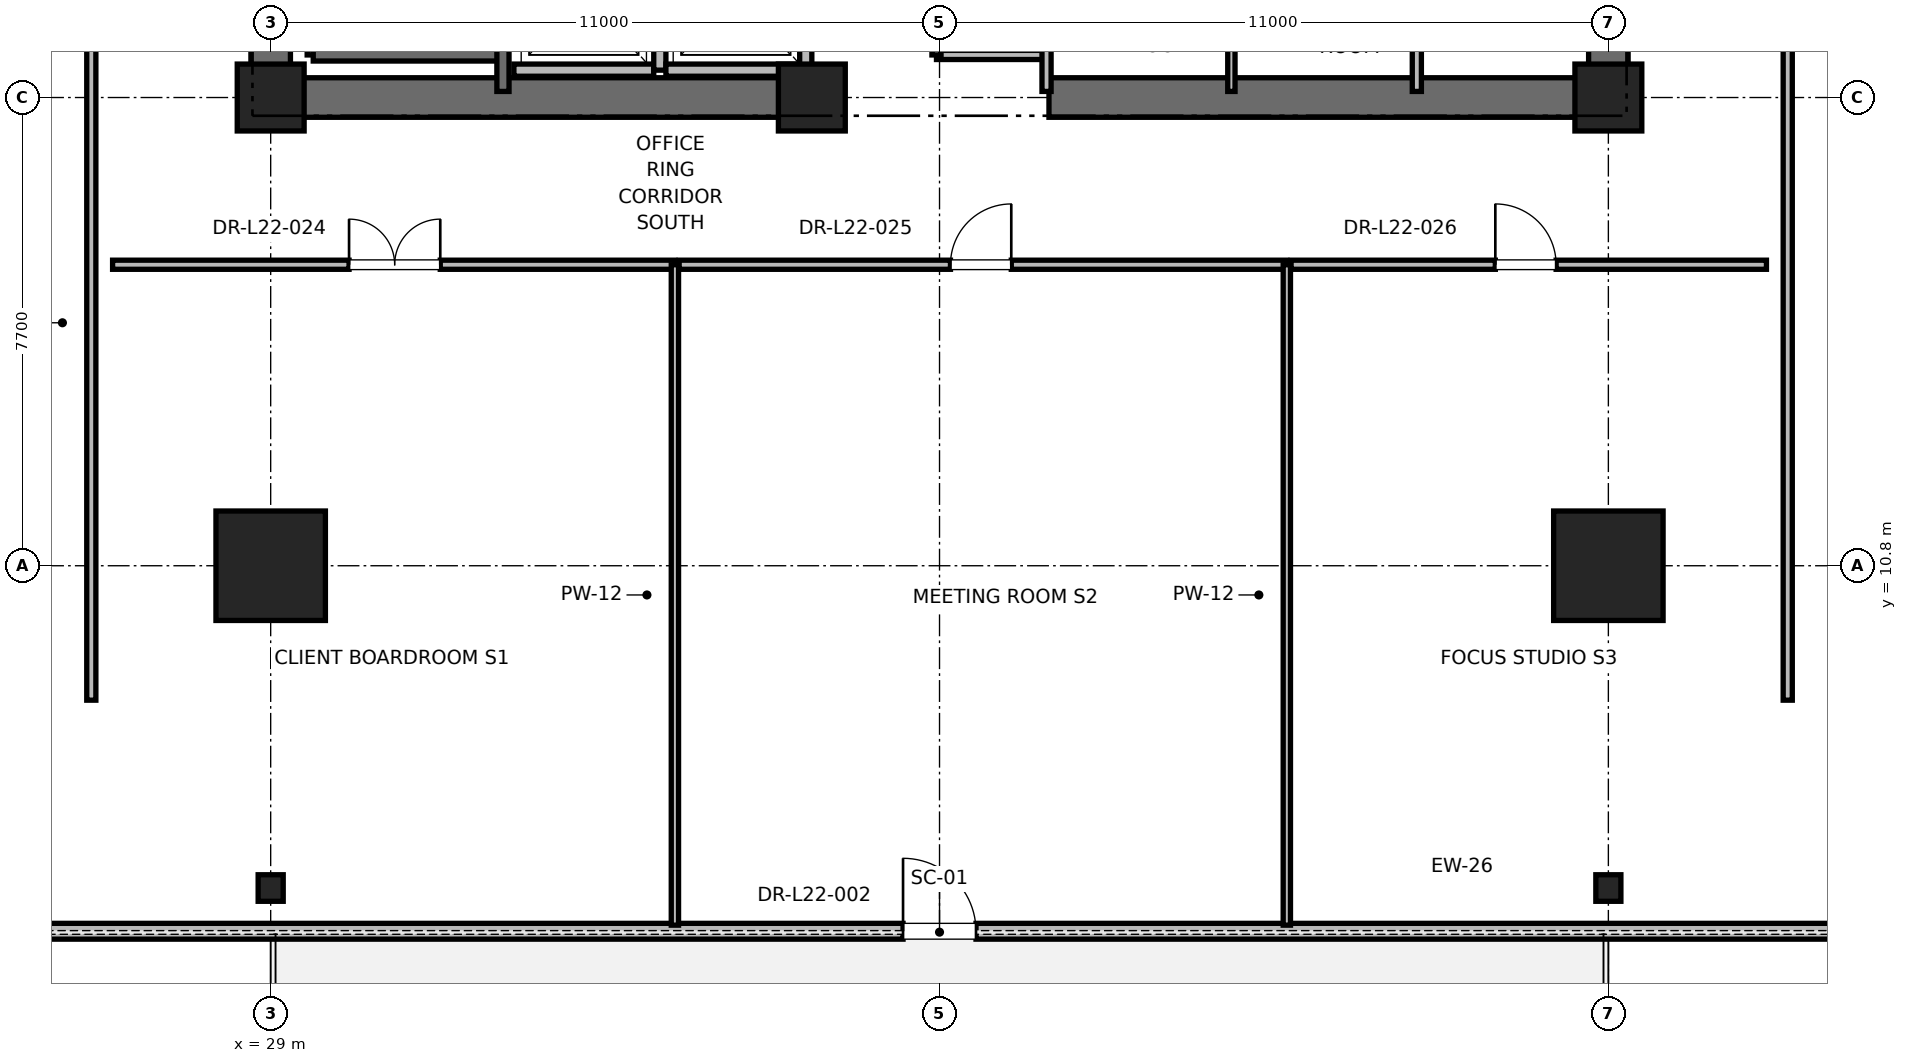
"""IFC4 building model, lengths in metres.
Left out: names, types, materials, properties, quantities, classifications, styles, units other than length and angle.
Written with IfcOpenShell. Run it as: python <this file> out.ifc"""

import sys

from ifc_helpers import new_model, si_unit, direction, frame, frame_2d, origin, origin_2d, place, context, subcontext, project, spatial, rectangle, i_section, extrude, element, fill, save


model = new_model("IFC4")
c1 = context("Model", 3, precision=1e-05, world=origin(), true_north=direction((0.0, 1.0)))
c2 = subcontext(c1, "Body", "Model", "MODEL_VIEW")
j1 = project(units=[si_unit("LENGTHUNIT", "METRE"), si_unit("PLANEANGLEUNIT", "RADIAN")], contexts=[c1])
p1 = place(None, origin())
s1 = spatial("IfcSite", under=j1, at=p1, CompositionType="ELEMENT")
p2 = place(p1, origin())
s2 = spatial("IfcBuilding", under=s1, at=p2, CompositionType="ELEMENT")
p3 = place(p2, frame((0.0, 0.0, 95.6)))
s3 = spatial("IfcBuildingStorey", under=s2, at=p3, CompositionType="ELEMENT", Elevation=95.6)
for number, where, z_axis, x_axis in (
    (1, (29.0, 10.8, 0.0), (0.0, 0.0, 1.0), (1.0, 0.0, 0.0)),
    (2, (51.0, 10.8, 0.0), (0.0, 0.0, 1.0), (1.0, 0.0, 0.0)),
):
    element("IfcColumn", number, at=place(p3, frame(where, z_axis=z_axis, x_axis=x_axis)), inside=s3, PredefinedType="COLUMN", context=c2, shape_type="SweptSolid", body=[
        extrude(rectangle(XDim=1.8, YDim=1.8, at=origin_2d()), origin(), (0.0, 0.0, 1.0), 4.0),
    ])
for number, where, z_axis, x_axis in (
    (3, (29.0, 5.5, 0.0), (0.0, 0.0, 1.0), (1.0, 0.0, 0.0)),
    (4, (51.0, 5.5, 0.0), (0.0, 0.0, 1.0), (1.0, 0.0, 0.0)),
):
    element("IfcColumn", number, at=place(p3, frame(where, z_axis=z_axis, x_axis=x_axis)), inside=s3, PredefinedType="COLUMN", context=c2, shape_type="SweptSolid", body=[
        extrude(i_section(OverallWidth=0.412, OverallDepth=0.437, WebThickness=0.036, FlangeThickness=0.058, FilletRadius=0.015, at=origin_2d()), origin(), (0.0, 0.0, 1.0), 4.0),
    ])
for number, where, z_axis, x_axis in (
    (5, (29.0, 18.5, 0.0), (0.0, 0.0, 1.0), (1.0, 0.0, 0.0)),
    (6, (51.0, 18.5, 0.0), (0.0, 0.0, 1.0), (1.0, 0.0, 0.0)),
    (7, (37.9, 18.5, 0.0), (0.0, 0.0, 1.0), (1.0, 0.0, 0.0)),
):
    element("IfcColumn", number, at=place(p3, frame(where, z_axis=z_axis, x_axis=x_axis)), inside=s3, PredefinedType="PILASTER", context=c2, shape_type="SweptSolid", body=[
        extrude(rectangle(XDim=1.1, YDim=1.1, at=origin_2d()), origin(), (0.0, 0.0, 1.0), 4.0),
    ])
for number, where, z_axis, x_axis in (
    (8, (29.0, 18.5, 0.0), (0.0, 0.0, 1.0), (1.0, 0.0, 0.0)),
    (9, (41.8, 18.5, 0.0), (0.0, 0.0, 1.0), (1.0, 0.0, 0.0)),
):
    element("IfcWall", number, at=place(p3, frame(where, z_axis=z_axis, x_axis=x_axis)), inside=s3, PredefinedType="SHEAR", context=c2, shape_type="SweptSolid", body=[
        extrude(rectangle(XDim=9.2, YDim=0.65, at=frame_2d((4.6, 0.0))), origin(), (0.0, 0.0, 1.0), 3.76),
    ])
p4 = place(p3, frame((29.0, 18.5, 0.0), z_axis=(0.0, 0.0, 1.0), x_axis=(0.0, 1.0, 0.0)))
e10 = element("IfcWall", 10, at=p4, inside=s3, PredefinedType="SHEAR", context=c2, shape_type="SweptSolid", body=[
    extrude(rectangle(XDim=8.8, YDim=0.65, at=frame_2d((4.4, 0.0))), origin(), (0.0, 0.0, 1.0), 3.76),
])
p5 = place(p3, frame((51.0, 18.5, 0.0), z_axis=(0.0, 0.0, 1.0), x_axis=(0.0, 1.0, 0.0)))
e11 = element("IfcWall", 11, at=p5, inside=s3, PredefinedType="SHEAR", context=c2, shape_type="SweptSolid", body=[
    extrude(rectangle(XDim=5.8, YDim=0.65, at=frame_2d((2.9, 0.0))), origin(), (0.0, 0.0, 1.0), 3.76),
])
p6 = place(p3, frame((17.413, 4.789, 0.0), z_axis=(0.0, 0.0, 1.0), x_axis=(1.0, 0.0, 0.0)))
e12 = element("IfcWall", 12, at=p6, inside=s3, PredefinedType="PARAPET", context=c2, shape_type="SweptSolid", body=[
    extrude(rectangle(XDim=45.174, YDim=0.26, at=frame_2d((22.587, 0.0))), origin(), (0.0, 0.0, 1.0), 3.76),
])
p7 = place(p6, frame((4.2, 0.0, 0.85)))
e13 = element("IfcOpeningElement", 13, at=p7, cuts=e12, PredefinedType="OPENING", context=c2, shape_type="SweptSolid", body=[
    extrude(rectangle(XDim=1.8, YDim=2.2, at=frame_2d((0.9, 1.1))), frame((0.0, 0.13, 0.0), z_axis=(0.0, -1.0, 0.0), x_axis=(1.0, 0.0, 0.0)), (0.0, 0.0, 1.0), 0.26),
])
p8 = place(p6, frame((21.987, 0.0, 0.0)))
e14 = element("IfcOpeningElement", 14, at=p8, cuts=e12, PredefinedType="OPENING", context=c2, shape_type="SweptSolid", body=[
    extrude(rectangle(XDim=1.2, YDim=2.2, at=frame_2d((0.6, 1.1))), frame((0.0, 0.13, 0.0), z_axis=(0.0, -1.0, 0.0), x_axis=(1.0, 0.0, 0.0)), (0.0, 0.0, 1.0), 0.26),
])
p9 = place(p6, frame((39.174, 0.0, 0.85)))
e15 = element("IfcOpeningElement", 15, at=p9, cuts=e12, PredefinedType="OPENING", context=c2, shape_type="SweptSolid", body=[
    extrude(rectangle(XDim=1.8, YDim=2.2, at=frame_2d((0.9, 1.1))), frame((0.0, 0.13, 0.0), z_axis=(0.0, -1.0, 0.0), x_axis=(1.0, 0.0, 0.0)), (0.0, 0.0, 1.0), 0.26),
])
p10 = place(p3, frame((29.7, 19.2, 0.0), z_axis=(0.0, 0.0, 1.0), x_axis=(0.0, 1.0, 0.0)))
e16 = element("IfcWall", 16, at=p10, inside=s3, PredefinedType="SOLIDWALL", context=c2, shape_type="SweptSolid", body=[
    extrude(rectangle(XDim=8.15, YDim=0.2, at=frame_2d((4.075, 0.0))), origin(), (0.0, 0.0, 1.0), 3.76),
])
p11 = place(p3, frame((29.7, 19.2, 0.0), z_axis=(0.0, 0.0, 1.0), x_axis=(1.0, 0.0, 0.0)))
e17 = element("IfcWall", 17, at=p11, inside=s3, PredefinedType="SOLIDWALL", context=c2, shape_type="SweptSolid", body=[
    extrude(rectangle(XDim=3.12, YDim=0.2, at=frame_2d((1.56, 0.0))), origin(), (0.0, 0.0, 1.0), 3.76),
])
p12 = place(p3, frame((32.82, 18.6, 0.0), z_axis=(0.0, 0.0, 1.0), x_axis=(0.0, 1.0, 0.0)))
e18 = element("IfcWall", 18, at=p12, inside=s3, PredefinedType="SOLIDWALL", context=c2, shape_type="SweptSolid", body=[
    extrude(rectangle(XDim=8.78, YDim=0.2, at=frame_2d((4.39, 0.0))), origin(), (0.0, 0.0, 1.0), 3.76),
])
p13 = place(p3, frame((33.0, 18.95, 0.0), z_axis=(0.0, 0.0, 1.0), x_axis=(1.0, 0.0, 0.0)))
e19 = element("IfcWall", 19, at=p13, inside=s3, PredefinedType="SOLIDWALL", context=c2, shape_type="SweptSolid", body=[
    extrude(rectangle(XDim=2.3, YDim=0.2, at=frame_2d((1.15, 0.0))), origin(), (0.0, 0.0, 1.0), 3.76),
])
p14 = place(p3, frame((35.4, 18.95, 0.0), z_axis=(0.0, 0.0, 1.0), x_axis=(0.0, 1.0, 0.0)))
e20 = element("IfcWall", 20, at=p14, inside=s3, PredefinedType="SOLIDWALL", context=c2, shape_type="SweptSolid", body=[
    extrude(rectangle(XDim=2.6, YDim=0.2, at=frame_2d((1.3, 0.0))), origin(), (0.0, 0.0, 1.0), 3.76),
])
p15 = place(p3, frame((35.5, 18.95, 0.0), z_axis=(0.0, 0.0, 1.0), x_axis=(1.0, 0.0, 0.0)))
e21 = element("IfcWall", 21, at=p15, inside=s3, PredefinedType="SOLIDWALL", context=c2, shape_type="SweptSolid", body=[
    extrude(rectangle(XDim=2.3, YDim=0.2, at=frame_2d((1.15, 0.0))), origin(), (0.0, 0.0, 1.0), 2.54),
])
p16 = place(p3, frame((37.8, 18.95, 0.0), z_axis=(0.0, 0.0, 1.0), x_axis=(0.0, 1.0, 0.0)))
e22 = element("IfcWall", 22, at=p16, inside=s3, PredefinedType="SOLIDWALL", context=c2, shape_type="SweptSolid", body=[
    extrude(rectangle(XDim=2.6, YDim=0.2, at=frame_2d((1.3, 0.0))), origin(), (0.0, 0.0, 1.0), 2.54),
])
p17 = place(p3, frame((39.95, 19.2, 0.0), z_axis=(0.0, 0.0, 1.0), x_axis=(1.0, 0.0, 0.0)))
e23 = element("IfcWall", 23, at=p17, inside=s3, PredefinedType="PARTITIONING", context=c2, shape_type="SweptSolid", body=[
    extrude(rectangle(XDim=1.81, YDim=0.15, at=frame_2d((0.905, 0.0))), origin(), (0.0, 0.0, 1.0), 2.85),
])
p18 = place(p3, frame((41.76, 18.6, 0.0), z_axis=(0.0, 0.0, 1.0), x_axis=(0.0, 1.0, 0.0)))
e24 = element("IfcWall", 24, at=p18, inside=s3, PredefinedType="PARTITIONING", context=c2, shape_type="SweptSolid", body=[
    extrude(rectangle(XDim=3.6, YDim=0.15, at=frame_2d((1.8, 0.0))), origin(), (0.0, 0.0, 1.0), 2.54),
])
p19 = place(p3, frame((39.95, 19.2, 0.0), z_axis=(0.0, 0.0, 1.0), x_axis=(0.0, 1.0, 0.0)))
e25 = element("IfcWall", 25, at=p19, inside=s3, PredefinedType="PARTITIONING", context=c2, shape_type="SweptSolid", body=[
    extrude(rectangle(XDim=3.0, YDim=0.15, at=frame_2d((1.5, 0.0))), origin(), (0.0, 0.0, 1.0), 2.85),
])
p20 = place(p19, frame((1.05, 0.0, 0.0)))
e26 = element("IfcOpeningElement", 26, at=p20, cuts=e25, PredefinedType="OPENING", context=c2, shape_type="SweptSolid", body=[
    extrude(rectangle(XDim=0.9, YDim=2.1, at=frame_2d((0.45, 1.05))), frame((0.0, 0.075, 0.0), z_axis=(0.0, -1.0, 0.0), x_axis=(1.0, 0.0, 0.0)), (0.0, 0.0, 1.0), 0.15),
])
p21 = place(p3, frame((47.85, 18.6, 0.0), z_axis=(0.0, 0.0, 1.0), x_axis=(0.0, 1.0, 0.0)))
e27 = element("IfcWall", 27, at=p21, inside=s3, PredefinedType="PARTITIONING", context=c2, shape_type="SweptSolid", body=[
    extrude(rectangle(XDim=2.54, YDim=0.15, at=frame_2d((1.27, 0.0))), origin(), (0.0, 0.0, 1.0), 2.85),
])
p22 = place(p3, frame((44.8, 18.6, 0.0), z_axis=(0.0, 0.0, 1.0), x_axis=(0.0, 1.0, 0.0)))
e28 = element("IfcWall", 28, at=p22, inside=s3, PredefinedType="PARTITIONING", context=c2, shape_type="SweptSolid", body=[
    extrude(rectangle(XDim=3.02, YDim=0.12, at=frame_2d((1.51, 0.0))), origin(), (0.0, 0.0, 1.0), 2.85),
])
p23 = place(p3, frame((26.4, 15.75, 0.0), z_axis=(0.0, 0.0, 1.0), x_axis=(1.0, 0.0, 0.0)))
e29 = element("IfcWall", 29, at=p23, inside=s3, PredefinedType="PARTITIONING", context=c2, shape_type="SweptSolid", body=[
    extrude(rectangle(XDim=9.248, YDim=0.15, at=frame_2d((4.624, 0.0))), origin(), (0.0, 0.0, 1.0), 2.85),
])
p24 = place(p23, frame((3.889, 0.0, 0.0)))
e30 = element("IfcOpeningElement", 30, at=p24, cuts=e29, PredefinedType="OPENING", context=c2, shape_type="SweptSolid", body=[
    extrude(rectangle(XDim=1.5, YDim=2.25, at=frame_2d((0.75, 1.125))), frame((0.0, 0.075, 0.0), z_axis=(0.0, -1.0, 0.0), x_axis=(1.0, 0.0, 0.0)), (0.0, 0.0, 1.0), 0.15),
])
p25 = place(p3, frame((35.648, 4.889, 0.0), z_axis=(0.0, 0.0, 1.0), x_axis=(0.0, 1.0, 0.0)))
e31 = element("IfcWall", 31, at=p25, inside=s3, PredefinedType="PARTITIONING", context=c2, shape_type="SweptSolid", body=[
    extrude(rectangle(XDim=10.861, YDim=0.12, at=frame_2d((5.43, 0.0))), origin(), (0.0, 0.0, 1.0), 2.39),
])
p26 = place(p3, frame((35.718, 15.75, 0.0), z_axis=(0.0, 0.0, 1.0), x_axis=(1.0, 0.0, 0.0)))
e32 = element("IfcWall", 32, at=p26, inside=s3, PredefinedType="PARTITIONING", context=c2, shape_type="SweptSolid", body=[
    extrude(rectangle(XDim=9.994, YDim=0.15, at=frame_2d((4.997, 0.0))), origin(), (0.0, 0.0, 1.0), 2.85),
])
p27 = place(p26, frame((4.462, 0.0, 0.0)))
e33 = element("IfcOpeningElement", 33, at=p27, cuts=e32, PredefinedType="OPENING", context=c2, shape_type="SweptSolid", body=[
    extrude(rectangle(XDim=1.0, YDim=2.15, at=frame_2d((0.5, 1.075))), frame((0.0, 0.075, 0.0), z_axis=(0.0, -1.0, 0.0), x_axis=(1.0, 0.0, 0.0)), (0.0, 0.0, 1.0), 0.15),
])
p28 = place(p3, frame((45.712, 4.889, 0.0), z_axis=(0.0, 0.0, 1.0), x_axis=(0.0, 1.0, 0.0)))
e34 = element("IfcWall", 34, at=p28, inside=s3, PredefinedType="PARTITIONING", context=c2, shape_type="SweptSolid", body=[
    extrude(rectangle(XDim=10.861, YDim=0.12, at=frame_2d((5.43, 0.0))), origin(), (0.0, 0.0, 1.0), 2.39),
])
p29 = place(p3, frame((45.782, 15.75, 0.0), z_axis=(0.0, 0.0, 1.0), x_axis=(1.0, 0.0, 0.0)))
e35 = element("IfcWall", 35, at=p29, inside=s3, PredefinedType="PARTITIONING", context=c2, shape_type="SweptSolid", body=[
    extrude(rectangle(XDim=7.818, YDim=0.15, at=frame_2d((3.909, 0.0))), origin(), (0.0, 0.0, 1.0), 2.85),
])
p30 = place(p29, frame((3.359, 0.0, 0.0)))
e36 = element("IfcOpeningElement", 36, at=p30, cuts=e35, PredefinedType="OPENING", context=c2, shape_type="SweptSolid", body=[
    extrude(rectangle(XDim=1.0, YDim=2.15, at=frame_2d((0.5, 1.075))), frame((0.0, 0.075, 0.0), z_axis=(0.0, -1.0, 0.0), x_axis=(1.0, 0.0, 0.0)), (0.0, 0.0, 1.0), 0.15),
])
p31 = place(p3, frame((26.05, 8.589, 0.0), z_axis=(0.0, 0.0, 1.0), x_axis=(0.0, 1.0, 0.0)))
e37 = element("IfcWall", 37, at=p31, inside=s3, PredefinedType="PARTITIONING", context=c2, shape_type="SweptSolid", body=[
    extrude(rectangle(XDim=15.885, YDim=0.15, at=frame_2d((7.943, 0.0))), origin(), (0.0, 0.0, 1.0), 2.85),
])
p32 = place(p31, frame((12.413, 0.0, 0.0)))
e38 = element("IfcOpeningElement", 38, at=p32, cuts=e37, PredefinedType="OPENING", context=c2, shape_type="SweptSolid", body=[
    extrude(rectangle(XDim=1.0, YDim=2.15, at=frame_2d((0.5, 1.075))), frame((0.0, 0.075, 0.0), z_axis=(0.0, -1.0, 0.0), x_axis=(1.0, 0.0, 0.0)), (0.0, 0.0, 1.0), 0.15),
])
p33 = place(p3, frame((53.95, 8.589, 0.0), z_axis=(0.0, 0.0, 1.0), x_axis=(0.0, 1.0, 0.0)))
e39 = element("IfcWall", 39, at=p33, inside=s3, PredefinedType="PARTITIONING", context=c2, shape_type="SweptSolid", body=[
    extrude(rectangle(XDim=21.937, YDim=0.15, at=frame_2d((10.968, 0.0))), origin(), (0.0, 0.0, 1.0), 2.85),
])
p34 = place(p33, frame((15.439, 0.0, 0.0)))
e40 = element("IfcOpeningElement", 40, at=p34, cuts=e39, PredefinedType="OPENING", context=c2, shape_type="SweptSolid", body=[
    extrude(rectangle(XDim=1.0, YDim=2.15, at=frame_2d((0.5, 1.075))), frame((0.0, 0.075, 0.0), z_axis=(0.0, -1.0, 0.0), x_axis=(1.0, 0.0, 0.0)), (0.0, 0.0, 1.0), 0.15),
])
p35 = place(p8, origin())
e41 = element("IfcDoor", 41, at=p35, inside=s3, OperationType="SINGLE_SWING_LEFT", PredefinedType="DOOR", context=c2, shape_type="SweptSolid", body=[
    extrude(rectangle(XDim=1.2, YDim=2.2, at=frame_2d((0.6, 1.1))), frame((0.0, 0.025, 0.0), z_axis=(0.0, -1.0, 0.0), x_axis=(1.0, 0.0, 0.0)), (0.0, 0.0, 1.0), 0.05),
])
fill(e14, e41)
p36 = place(p24, origin())
e42 = element("IfcDoor", 42, at=p36, inside=s3, OperationType="DOUBLE_DOOR_SINGLE_SWING", PredefinedType="DOOR", context=c2, shape_type="SweptSolid", body=[
    extrude(rectangle(XDim=1.5, YDim=2.25, at=frame_2d((0.75, 1.125))), frame((0.0, 0.025, 0.0), z_axis=(0.0, -1.0, 0.0), x_axis=(1.0, 0.0, 0.0)), (0.0, 0.0, 1.0), 0.05),
])
fill(e30, e42)
p37 = place(p27, origin())
e43 = element("IfcDoor", 43, at=p37, inside=s3, OperationType="SINGLE_SWING_RIGHT", PredefinedType="DOOR", context=c2, shape_type="SweptSolid", body=[
    extrude(rectangle(XDim=1.0, YDim=2.15, at=frame_2d((0.5, 1.075))), frame((0.0, 0.025, 0.0), z_axis=(0.0, -1.0, 0.0), x_axis=(1.0, 0.0, 0.0)), (0.0, 0.0, 1.0), 0.05),
])
fill(e33, e43)
p38 = place(p30, origin())
e44 = element("IfcDoor", 44, at=p38, inside=s3, OperationType="SINGLE_SWING_LEFT", PredefinedType="DOOR", context=c2, shape_type="SweptSolid", body=[
    extrude(rectangle(XDim=1.0, YDim=2.15, at=frame_2d((0.5, 1.075))), frame((0.0, 0.025, 0.0), z_axis=(0.0, -1.0, 0.0), x_axis=(1.0, 0.0, 0.0)), (0.0, 0.0, 1.0), 0.05),
])
fill(e36, e44)
save(model, sys.argv[1])
